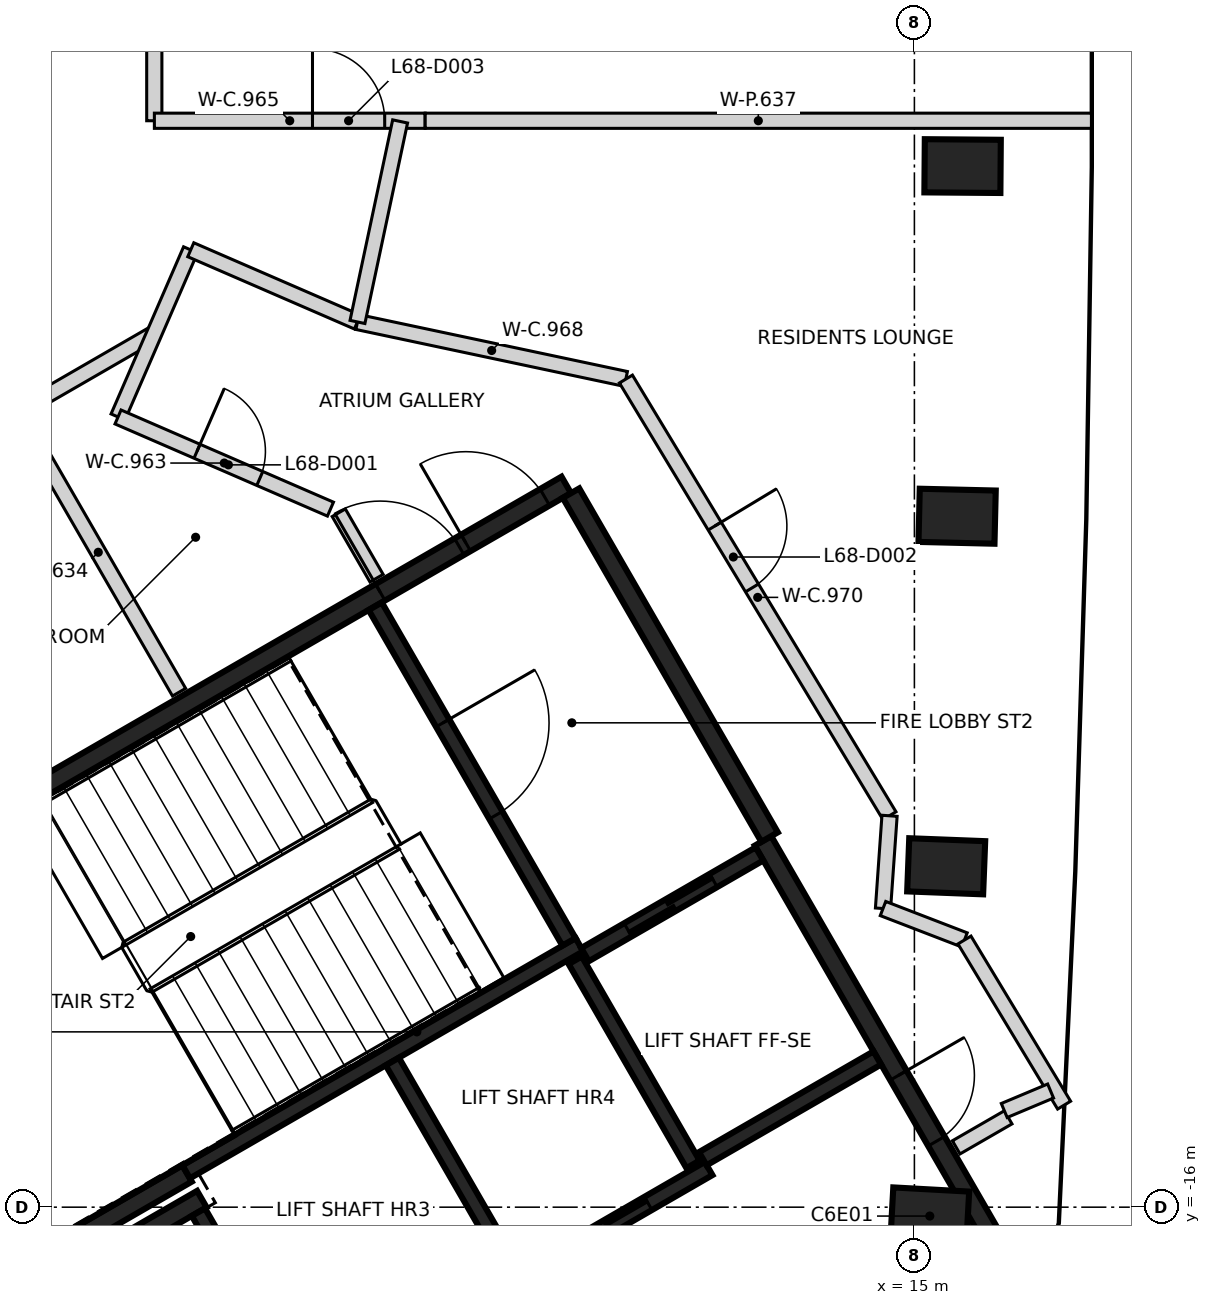
"""IFC4 building model, lengths in metres.
Left out: names, types, materials, properties, quantities, classifications, styles, units other than length and angle.
Written with IfcOpenShell. Run it as: python <this file> out.ifc"""

import sys

from ifc_helpers import new_model, si_unit, direction, frame, frame_2d, origin, origin_2d, place, context, subcontext, project, spatial, rectangle, extrude, element, fill, save


model = new_model("IFC4")
c1 = context("Model", 3, precision=1e-05, world=origin(), true_north=direction((0.0, 1.0)))
c2 = subcontext(c1, "Body", "Model", "MODEL_VIEW")
j1 = project(units=[si_unit("LENGTHUNIT", "METRE"), si_unit("PLANEANGLEUNIT", "RADIAN")], contexts=[c1])
p1 = place(None, origin())
s1 = spatial("IfcSite", under=j1, at=p1, CompositionType="ELEMENT")
p2 = place(p1, origin())
s2 = spatial("IfcBuilding", under=s1, at=p2, CompositionType="ELEMENT")
p3 = place(p2, frame((0.0, 0.0, 269.4)))
s3 = spatial("IfcBuildingStorey", under=s2, at=p3, CompositionType="ELEMENT", Elevation=269.4)
for number, where, z_axis, x_axis in (
    (1, (15.202, -16.117, -0.35), (0.0, 0.0, 1.0), (-0.998, 0.055, 0.0)),
    (2, (15.418, -11.515, -0.35), (0.0, 0.0, 1.0), (-0.999, 0.039, 0.0)),
    (3, (15.562, -6.91, -0.35), (0.0, 0.0, 1.0), (-1.0, 0.024, 0.0)),
    (4, (15.634, -2.303, -0.35), (0.0, 0.0, 1.0), (-1.0, 0.008, 0.0)),
):
    element("IfcColumn", number, at=place(p3, frame(where, z_axis=z_axis, x_axis=x_axis)), inside=s3, PredefinedType="COLUMN", context=c2, shape_type="SweptSolid", body=[
        extrude(rectangle(XDim=1.0, YDim=0.7, at=origin_2d()), origin(), (0.0, 0.0, 1.0), 3.6),
    ])
p4 = place(p3, frame((0.417, -12.273, 0.0), z_axis=(0.0, 0.0, 1.0), x_axis=(0.866021906294, 0.500006057782, 0.0)))
e5 = element("IfcWall", 5, at=p4, inside=s3, PredefinedType="SHEAR", context=c2, shape_type="SweptSolid", body=[
    extrude(rectangle(XDim=11.55, YDim=0.25, at=frame_2d((5.775, 0.0))), origin(), (0.0, 0.0, 1.0), 3.25),
])
p5 = place(p4, frame((10.025, 0.0, 0.0)))
e6 = element("IfcOpeningElement", 6, at=p5, cuts=e5, PredefinedType="OPENING", context=c2, shape_type="SweptSolid", body=[
    extrude(rectangle(XDim=1.2, YDim=2.1, at=frame_2d((0.6, 1.05))), frame((0.0, 0.135, 0.0), z_axis=(0.0, -1.0, 0.0), x_axis=(1.0, 0.0, 0.0)), (0.0, 0.0, 1.0), 0.27),
])
p6 = place(p4, frame((8.725, 0.0, 0.0)))
e7 = element("IfcOpeningElement", 7, at=p6, cuts=e5, PredefinedType="OPENING", context=c2, shape_type="SweptSolid", body=[
    extrude(rectangle(XDim=1.2, YDim=2.1, at=frame_2d((0.6, 1.05))), frame((0.0, 0.135, 0.0), z_axis=(0.0, -1.0, 0.0), x_axis=(1.0, 0.0, 0.0)), (0.0, 0.0, 1.0), 0.27),
])
p7 = place(p3, frame((13.008, -11.181, 0.0), z_axis=(0.0, 0.0, 1.0), x_axis=(0.500001955336, -0.866024274868, 0.0)))
e8 = element("IfcWall", 8, at=p7, inside=s3, PredefinedType="SHEAR", context=c2, shape_type="SweptSolid", body=[
    extrude(rectangle(XDim=6.125, YDim=0.25, at=frame_2d((3.062, 0.0))), origin(), (0.0, 0.0, 1.0), 3.25),
])
p8 = place(p7, frame((3.563, 0.0, 0.0)))
e9 = element("IfcOpeningElement", 9, at=p8, cuts=e8, PredefinedType="OPENING", context=c2, shape_type="SweptSolid", body=[
    extrude(rectangle(XDim=1.0, YDim=2.1, at=frame_2d((0.5, 1.05))), frame((0.0, 0.135, 0.0), z_axis=(0.0, -1.0, 0.0), x_axis=(1.0, 0.0, 0.0)), (0.0, 0.0, 1.0), 0.27),
])
p9 = place(p3, frame((10.483, -6.606, 0.0), z_axis=(0.0, 0.0, 1.0), x_axis=(0.49999885962, -0.866026062182, 0.0)))
e10 = element("IfcWall", 10, at=p9, inside=s3, PredefinedType="SHEAR", context=c2, shape_type="SweptSolid", body=[
    extrude(rectangle(XDim=5.225, YDim=0.25, at=frame_2d((2.612, 0.0))), origin(), (0.0, 0.0, 1.0), 3.25),
])
p10 = place(p3, frame((5.431, -15.556, 0.0), z_axis=(0.0, 0.0, 1.0), x_axis=(-0.866022940537, -0.500004266446, 0.0)))
e11 = element("IfcWall", 11, at=p10, inside=s3, PredefinedType="SHEAR", context=c2, shape_type="SweptSolid", body=[
    extrude(rectangle(XDim=2.575, YDim=0.25, at=frame_2d((1.287, 0.0))), origin(), (0.0, 0.0, 1.0), 3.25),
])
p11 = place(p3, frame((4.145, -16.749, 0.0), z_axis=(0.0, 0.0, 1.0), x_axis=(0.866038183914, 0.499977863513, 0.0)))
e12 = element("IfcWall", 12, at=p11, inside=s3, PredefinedType="SHEAR", context=c2, shape_type="SweptSolid", body=[
    extrude(rectangle(XDim=1.71, YDim=0.25, at=frame_2d((0.855, 0.0))), origin(), (0.0, 0.0, 1.0), 3.25),
])
p12 = place(p3, frame((5.419, -15.534, 0.0), z_axis=(0.0, 0.0, 1.0), x_axis=(0.866029065029, 0.499993658486, 0.0)))
e13 = element("IfcWall", 13, at=p12, inside=s3, PredefinedType="SHEAR", context=c2, shape_type="SweptSolid", body=[
    extrude(rectangle(XDim=5.974, YDim=0.2, at=frame_2d((2.987, 0.0))), origin(), (0.0, 0.0, 1.0), 3.25),
])
p13 = place(p3, frame((7.01, -18.542, 0.0), z_axis=(0.0, 0.0, 1.0), x_axis=(0.866030299012, 0.499991521122, 0.0)))
e14 = element("IfcWall", 14, at=p13, inside=s3, PredefinedType="SHEAR", context=c2, shape_type="SweptSolid", body=[
    extrude(rectangle(XDim=6.1, YDim=0.2, at=frame_2d((3.05, 0.0))), origin(), (0.0, 0.0, 1.0), 3.25),
])
p14 = place(p13, frame((1.0, 0.0, 0.0)))
e15 = element("IfcOpeningElement", 15, at=p14, cuts=e14, PredefinedType="OPENING", context=c2, shape_type="SweptSolid", body=[
    extrude(rectangle(XDim=1.2, YDim=2.1, at=frame_2d((0.6, 1.05))), frame((0.0, 0.11, 0.0), z_axis=(0.0, -1.0, 0.0), x_axis=(1.0, 0.0, 0.0)), (0.0, 0.0, 1.0), 0.22),
])
p15 = place(p13, frame((3.982, 0.0, 0.0)))
e16 = element("IfcOpeningElement", 16, at=p15, cuts=e14, PredefinedType="OPENING", context=c2, shape_type="SweptSolid", body=[
    extrude(rectangle(XDim=1.2, YDim=2.1, at=frame_2d((0.6, 1.05))), frame((0.0, 0.11, 0.0), z_axis=(0.0, -1.0, 0.0), x_axis=(1.0, 0.0, 0.0)), (0.0, 0.0, 1.0), 0.22),
])
p16 = place(p3, frame((7.906, -8.094, 0.0), z_axis=(0.0, 0.0, 1.0), x_axis=(0.500027839223, -0.866009330205, 0.0)))
e17 = element("IfcWall", 17, at=p16, inside=s3, PredefinedType="SHEAR", context=c2, shape_type="SweptSolid", body=[
    extrude(rectangle(XDim=5.098, YDim=0.2, at=frame_2d((2.549, 0.0))), origin(), (0.0, 0.0, 1.0), 3.25),
])
p17 = place(p16, frame((1.774, 0.0, 0.0)))
e18 = element("IfcOpeningElement", 18, at=p17, cuts=e17, PredefinedType="OPENING", context=c2, shape_type="SweptSolid", body=[
    extrude(rectangle(XDim=1.4, YDim=2.1, at=frame_2d((0.7, 1.05))), frame((0.0, 0.11, 0.0), z_axis=(0.0, -1.0, 0.0), x_axis=(1.0, 0.0, 0.0)), (0.0, 0.0, 1.0), 0.22),
])
p18 = place(p3, frame((8.132, -14.084, 0.0), z_axis=(0.0, 0.0, 1.0), x_axis=(0.499997778408, -0.866026686418, 0.0)))
e19 = element("IfcWall", 19, at=p18, inside=s3, PredefinedType="SHEAR", context=c2, shape_type="SweptSolid", body=[
    extrude(rectangle(XDim=3.198, YDim=0.2, at=frame_2d((1.599, 0.0))), origin(), (0.0, 0.0, 1.0), 3.25),
])
p19 = place(p3, frame((6.96, -18.455, 0.0), z_axis=(0.0, 0.0, 1.0), x_axis=(-0.499926705758, 0.866067716099, 0.0)))
e20 = element("IfcWall", 20, at=p19, inside=s3, PredefinedType="SHEAR", context=c2, shape_type="SweptSolid", body=[
    extrude(rectangle(XDim=2.759, YDim=0.2, at=frame_2d((1.38, 0.0))), origin(), (0.0, 0.0, 1.0), 3.25),
])
p20 = place(p3, frame((12.088, -15.437, 0.0), z_axis=(0.0, 0.0, 1.0), x_axis=(-0.500026960575, 0.86600983753, 0.0)))
e21 = element("IfcWall", 21, at=p20, inside=s3, PredefinedType="SHEAR", context=c2, shape_type="SweptSolid", body=[
    extrude(rectangle(XDim=3.1, YDim=0.2, at=frame_2d((1.55, 0.0))), origin(), (0.0, 0.0, 1.0), 3.25),
])
p21 = place(p3, frame((10.666, -12.678, 0.0), z_axis=(0.0, 0.0, 1.0), x_axis=(0.866018407898, 0.500012117035, 0.0)))
e22 = element("IfcWall", 22, at=p21, inside=s3, PredefinedType="SHEAR", context=c2, shape_type="SweptSolid", body=[
    extrude(rectangle(XDim=2.651, YDim=0.2, at=frame_2d((1.325, 0.0))), origin(), (0.0, 0.0, 1.0), 3.25),
])
p22 = place(p21, frame((0.652, 0.0, 0.0)))
e23 = element("IfcOpeningElement", 23, at=p22, cuts=e22, PredefinedType="OPENING", context=c2, shape_type="SweptSolid", body=[
    extrude(rectangle(XDim=1.3, YDim=2.1, at=frame_2d((0.65, 1.05))), frame((0.0, 0.11, 0.0), z_axis=(0.0, -1.0, 0.0), x_axis=(1.0, 0.0, 0.0)), (0.0, 0.0, 1.0), 0.22),
])
p23 = place(p3, frame((14.512, -14.037, 0.0), z_axis=(0.0, 0.0, 1.0), x_axis=(-0.866018407898, -0.500012117035, 0.0)))
e24 = element("IfcWall", 24, at=p23, inside=s3, PredefinedType="SHEAR", context=c2, shape_type="SweptSolid", body=[
    extrude(rectangle(XDim=2.651, YDim=0.2, at=frame_2d((1.325, 0.0))), origin(), (0.0, 0.0, 1.0), 3.25),
])
p24 = place(p3, frame((1.401, -6.583, 0.0), z_axis=(0.0, 0.0, 1.0), x_axis=(0.865818713766, 0.500357826853, 0.0)))
e25 = element("IfcWall", 25, at=p24, inside=s3, PredefinedType="PARTITIONING", context=c2, shape_type="SweptSolid", body=[
    extrude(rectangle(XDim=4.157, YDim=0.2, at=frame_2d((2.079, 0.0))), origin(), (0.0, 0.0, 1.0), 3.25),
])
p25 = place(p3, frame((4.523, -5.604, 0.0), z_axis=(0.0, 0.0, 1.0), x_axis=(0.398033282066, 0.917370975324, 0.0)))
e26 = element("IfcWall", 26, at=p25, inside=s3, PredefinedType="PARTITIONING", context=c2, shape_type="SweptSolid", body=[
    extrude(rectangle(XDim=2.397, YDim=0.2, at=frame_2d((1.198, 0.0))), origin(), (0.0, 0.0, 1.0), 3.25),
])
p26 = place(p3, frame((4.523, -5.604, 0.0), z_axis=(0.0, 0.0, 1.0), x_axis=(0.917390838441, -0.397987499231, 0.0)))
e27 = element("IfcWall", 27, at=p26, inside=s3, PredefinedType="PARTITIONING", context=c2, shape_type="SweptSolid", body=[
    extrude(rectangle(XDim=3.046, YDim=0.2, at=frame_2d((1.523, 0.0))), origin(), (0.0, 0.0, 1.0), 3.25),
])
p27 = place(p26, frame((1.133, 0.0, 0.0)))
e28 = element("IfcOpeningElement", 28, at=p27, cuts=e27, PredefinedType="OPENING", context=c2, shape_type="SweptSolid", body=[
    extrude(rectangle(XDim=0.9, YDim=2.1, at=frame_2d((0.45, 1.05))), frame((0.0, 0.11, 0.0), z_axis=(0.0, -1.0, 0.0), x_axis=(1.0, 0.0, 0.0)), (0.0, 0.0, 1.0), 0.22),
])
p28 = place(p3, frame((5.0, -1.707, 0.0), z_axis=(0.0, 0.0, 1.0), x_axis=(0.0, 1.0, 0.0)))
e29 = element("IfcWall", 29, at=p28, inside=s3, PredefinedType="PARTITIONING", context=c2, shape_type="SweptSolid", body=[
    extrude(rectangle(XDim=6.211, YDim=0.2, at=frame_2d((3.105, 0.0))), origin(), (0.0, 0.0, 1.0), 3.25),
])
p29 = place(p28, frame((4.605, 0.0, 0.0)))
e30 = element("IfcOpeningElement", 30, at=p29, cuts=e29, PredefinedType="OPENING", context=c2, shape_type="SweptSolid", body=[
    extrude(rectangle(XDim=1.0, YDim=2.1, at=frame_2d((0.5, 1.05))), frame((0.0, 0.11, 0.0), z_axis=(0.0, -1.0, 0.0), x_axis=(1.0, 0.0, 0.0)), (0.0, 0.0, 1.0), 0.22),
])
p30 = place(p3, frame((5.001, -1.707, 0.0), z_axis=(0.0, 0.0, 1.0), x_axis=(1.0, 0.0, 0.0)))
e31 = element("IfcWall", 31, at=p30, inside=s3, PredefinedType="PARTITIONING", context=c2, shape_type="SweptSolid", body=[
    extrude(rectangle(XDim=3.562, YDim=0.2, at=frame_2d((1.781, 0.0))), origin(), (0.0, 0.0, 1.0), 3.25),
])
p31 = place(p30, frame((2.08, 0.0, 0.0)))
e32 = element("IfcOpeningElement", 32, at=p31, cuts=e31, PredefinedType="OPENING", context=c2, shape_type="SweptSolid", body=[
    extrude(rectangle(XDim=0.95, YDim=2.1, at=frame_2d((0.475, 1.05))), frame((0.0, 0.11, 0.0), z_axis=(0.0, -1.0, 0.0), x_axis=(1.0, 0.0, 0.0)), (0.0, 0.0, 1.0), 0.22),
])
p32 = place(p3, frame((5.48, -3.404, 0.0), z_axis=(0.0, 0.0, 1.0), x_axis=(0.917402729571, -0.39796008817, 0.0)))
e33 = element("IfcWall", 33, at=p32, inside=s3, PredefinedType="PARTITIONING", context=c2, shape_type="SweptSolid", body=[
    extrude(rectangle(XDim=2.389, YDim=0.2, at=frame_2d((1.195, 0.0))), origin(), (0.0, 0.0, 1.0), 3.25),
])
p33 = place(p3, frame((7.427, -6.864, 0.0), z_axis=(0.0, 0.0, 1.0), x_axis=(0.499942098031, -0.866058830921, 0.0)))
e34 = element("IfcWall", 34, at=p33, inside=s3, PredefinedType="PARTITIONING", context=c2, shape_type="SweptSolid", body=[
    extrude(rectangle(XDim=0.994, YDim=0.2, at=frame_2d((0.497, 0.0))), origin(), (0.0, 0.0, 1.0), 3.25),
])
p34 = place(p3, frame((7.673, -4.355, 0.0), z_axis=(0.0, 0.0, 1.0), x_axis=(0.978232876952, -0.207510092407, 0.0)))
e35 = element("IfcWall", 35, at=p34, inside=s3, PredefinedType="PARTITIONING", context=c2, shape_type="SweptSolid", body=[
    extrude(rectangle(XDim=3.61, YDim=0.2, at=frame_2d((1.805, 0.0))), origin(), (0.0, 0.0, 1.0), 3.25),
])
p35 = place(p3, frame((7.673, -4.354, 0.0), z_axis=(0.0, 0.0, 1.0), x_axis=(0.207939957157, 0.978141592111, 0.0)))
e36 = element("IfcWall", 36, at=p35, inside=s3, PredefinedType="PARTITIONING", context=c2, shape_type="SweptSolid", body=[
    extrude(rectangle(XDim=2.697, YDim=0.2, at=frame_2d((1.348, 0.0))), origin(), (0.0, 0.0, 1.0), 3.25),
])
p36 = place(p3, frame((11.205, -5.105, 0.0), z_axis=(0.0, 0.0, 1.0), x_axis=(0.516682442017, -0.856177116087, 0.0)))
e37 = element("IfcWall", 37, at=p36, inside=s3, PredefinedType="PARTITIONING", context=c2, shape_type="SweptSolid", body=[
    extrude(rectangle(XDim=6.71, YDim=0.2, at=frame_2d((3.355, 0.0))), origin(), (0.0, 0.0, 1.0), 3.25),
])
p37 = place(p36, frame((2.26, 0.0, 0.0)))
e38 = element("IfcOpeningElement", 38, at=p37, cuts=e37, PredefinedType="OPENING", context=c2, shape_type="SweptSolid", body=[
    extrude(rectangle(XDim=0.95, YDim=2.1, at=frame_2d((0.475, 1.05))), frame((0.0, 0.11, 0.0), z_axis=(0.0, -1.0, 0.0), x_axis=(1.0, 0.0, 0.0)), (0.0, 0.0, 1.0), 0.22),
])
p38 = place(p3, frame((14.587, -12.071, 0.0), z_axis=(0.0, 0.0, 1.0), x_axis=(0.070466777423, 0.997514126857, 0.0)))
e39 = element("IfcWall", 39, at=p38, inside=s3, PredefinedType="PARTITIONING", context=c2, shape_type="SweptSolid", body=[
    extrude(rectangle(XDim=1.223, YDim=0.2, at=frame_2d((0.611, 0.0))), origin(), (0.0, 0.0, 1.0), 3.25),
])
p39 = place(p3, frame((14.587, -12.071, 0.0), z_axis=(0.0, 0.0, 1.0), x_axis=(0.933192153307, -0.359377802606, 0.0)))
e40 = element("IfcWall", 40, at=p39, inside=s3, PredefinedType="PARTITIONING", context=c2, shape_type="SweptSolid", body=[
    extrude(rectangle(XDim=1.149, YDim=0.2, at=frame_2d((0.574, 0.0))), origin(), (0.0, 0.0, 1.0), 2.35),
])
p40 = place(p3, frame((15.55, -15.213, 0.0), z_axis=(0.0, 0.0, 1.0), x_axis=(0.865989998118, 0.500061319399, 0.0)))
e41 = element("IfcWall", 41, at=p40, inside=s3, PredefinedType="PARTITIONING", context=c2, shape_type="SweptSolid", body=[
    extrude(rectangle(XDim=0.79, YDim=0.2, at=frame_2d((0.395, 0.0))), origin(), (0.0, 0.0, 1.0), 3.25),
])
p41 = place(p3, frame((15.659, -12.485, 0.0), z_axis=(0.0, 0.0, 1.0), x_axis=(0.516729412104, -0.856148769003, 0.0)))
e42 = element("IfcWall", 42, at=p41, inside=s3, PredefinedType="PARTITIONING", context=c2, shape_type="SweptSolid", body=[
    extrude(rectangle(XDim=2.538, YDim=0.2, at=frame_2d((1.269, 0.0))), origin(), (0.0, 0.0, 1.0), 3.25),
])
p42 = place(p3, frame((16.182, -14.728, 0.0), z_axis=(0.0, 0.0, 1.0), x_axis=(0.922058491377, 0.387050563207, 0.0)))
e43 = element("IfcWall", 43, at=p42, inside=s3, PredefinedType="PARTITIONING", context=c2, shape_type="SweptSolid", body=[
    extrude(rectangle(XDim=0.662, YDim=0.2, at=frame_2d((0.331, 0.0))), origin(), (0.0, 0.0, 1.0), 3.25),
])
p43 = place(p3, frame((3.2, -5.543, 0.0), z_axis=(0.0, 0.0, 1.0), x_axis=(0.500060428066, -0.865990512813, 0.0)))
e44 = element("IfcWall", 44, at=p43, inside=s3, PredefinedType="PARTITIONING", context=c2, shape_type="SweptSolid", body=[
    extrude(rectangle(XDim=4.252, YDim=0.2, at=frame_2d((2.126, 0.0))), origin(), (0.0, 0.0, 1.0), 3.25),
])
p44 = place(p3, frame((8.564, -1.707, 0.0), z_axis=(0.0, 0.0, 1.0), x_axis=(1.0, 0.0, 0.0)))
e45 = element("IfcWall", 45, at=p44, inside=s3, PredefinedType="PARTITIONING", context=c2, shape_type="SweptSolid", body=[
    extrude(rectangle(XDim=8.765, YDim=0.2, at=frame_2d((4.383, 0.0))), origin(), (0.0, 0.0, 1.0), 2.35),
])
p45 = place(p22, origin())
e46 = element("IfcDoor", 46, at=p45, inside=s3, OperationType="SLIDING_TO_RIGHT", PredefinedType="DOOR", context=c2, shape_type="SweptSolid", body=[
    extrude(rectangle(XDim=1.3, YDim=2.1, at=frame_2d((0.65, 1.05))), frame((0.0, 0.025, 0.0), z_axis=(0.0, -1.0, 0.0), x_axis=(1.0, 0.0, 0.0)), (0.0, 0.0, 1.0), 0.05),
])
fill(e23, e46)
p46 = place(p15, origin())
e47 = element("IfcDoor", 47, at=p46, inside=s3, OperationType="DOUBLE_DOOR_SLIDING", PredefinedType="DOOR", context=c2, shape_type="SweptSolid", body=[
    extrude(rectangle(XDim=1.2, YDim=2.1, at=frame_2d((0.6, 1.05))), frame((0.0, 0.025, 0.0), z_axis=(0.0, -1.0, 0.0), x_axis=(1.0, 0.0, 0.0)), (0.0, 0.0, 1.0), 0.05),
])
fill(e16, e47)
p47 = place(p8, origin())
e48 = element("IfcDoor", 48, at=p47, inside=s3, OperationType="SINGLE_SWING_LEFT", PredefinedType="DOOR", context=c2, shape_type="SweptSolid", body=[
    extrude(rectangle(XDim=1.0, YDim=2.1, at=frame_2d((0.5, 1.05))), frame((0.0, 0.025, 0.0), z_axis=(0.0, -1.0, 0.0), x_axis=(1.0, 0.0, 0.0)), (0.0, 0.0, 1.0), 0.05),
])
fill(e9, e48)
p48 = place(p5, origin())
e49 = element("IfcDoor", 49, at=p48, inside=s3, OperationType="SINGLE_SWING_LEFT", PredefinedType="DOOR", context=c2, shape_type="SweptSolid", body=[
    extrude(rectangle(XDim=1.2, YDim=2.1, at=frame_2d((0.6, 1.05))), frame((0.0, 0.025, 0.0), z_axis=(0.0, -1.0, 0.0), x_axis=(1.0, 0.0, 0.0)), (0.0, 0.0, 1.0), 0.05),
])
fill(e6, e49)
p49 = place(p6, origin())
e50 = element("IfcDoor", 50, at=p49, inside=s3, OperationType="SINGLE_SWING_RIGHT", PredefinedType="DOOR", context=c2, shape_type="SweptSolid", body=[
    extrude(rectangle(XDim=1.2, YDim=2.1, at=frame_2d((0.6, 1.05))), frame((0.0, 0.025, 0.0), z_axis=(0.0, -1.0, 0.0), x_axis=(1.0, 0.0, 0.0)), (0.0, 0.0, 1.0), 0.05),
])
fill(e7, e50)
p50 = place(p17, origin())
e51 = element("IfcDoor", 51, at=p50, inside=s3, OperationType="SINGLE_SWING_RIGHT", PredefinedType="DOOR", context=c2, shape_type="SweptSolid", body=[
    extrude(rectangle(XDim=1.4, YDim=2.1, at=frame_2d((0.7, 1.05))), frame((0.0, 0.025, 0.0), z_axis=(0.0, -1.0, 0.0), x_axis=(1.0, 0.0, 0.0)), (0.0, 0.0, 1.0), 0.05),
])
fill(e18, e51)
p51 = place(p27, frame((0.9, 0.0, 0.0), z_axis=(0.0, 0.0, 1.0), x_axis=(-1.0, 0.0, 0.0)))
e52 = element("IfcDoor", 52, at=p51, inside=s3, OperationType="SINGLE_SWING_LEFT", PredefinedType="DOOR", context=c2, shape_type="SweptSolid", body=[
    extrude(rectangle(XDim=0.9, YDim=2.1, at=frame_2d((0.45, 1.05))), frame((0.0, 0.025, 0.0), z_axis=(0.0, -1.0, 0.0), x_axis=(1.0, 0.0, 0.0)), (0.0, 0.0, 1.0), 0.05),
])
fill(e28, e52)
p52 = place(p37, origin())
e53 = element("IfcDoor", 53, at=p52, inside=s3, OperationType="SINGLE_SWING_LEFT", PredefinedType="DOOR", context=c2, shape_type="SweptSolid", body=[
    extrude(rectangle(XDim=0.95, YDim=2.1, at=frame_2d((0.475, 1.05))), frame((0.0, 0.025, 0.0), z_axis=(0.0, -1.0, 0.0), x_axis=(1.0, 0.0, 0.0)), (0.0, 0.0, 1.0), 0.05),
])
fill(e38, e53)
p53 = place(p31, origin())
e54 = element("IfcDoor", 54, at=p53, inside=s3, OperationType="SINGLE_SWING_LEFT", PredefinedType="DOOR", context=c2, shape_type="SweptSolid", body=[
    extrude(rectangle(XDim=0.95, YDim=2.1, at=frame_2d((0.475, 1.05))), frame((0.0, 0.025, 0.0), z_axis=(0.0, -1.0, 0.0), x_axis=(1.0, 0.0, 0.0)), (0.0, 0.0, 1.0), 0.05),
])
fill(e32, e54)
save(model, sys.argv[1])
